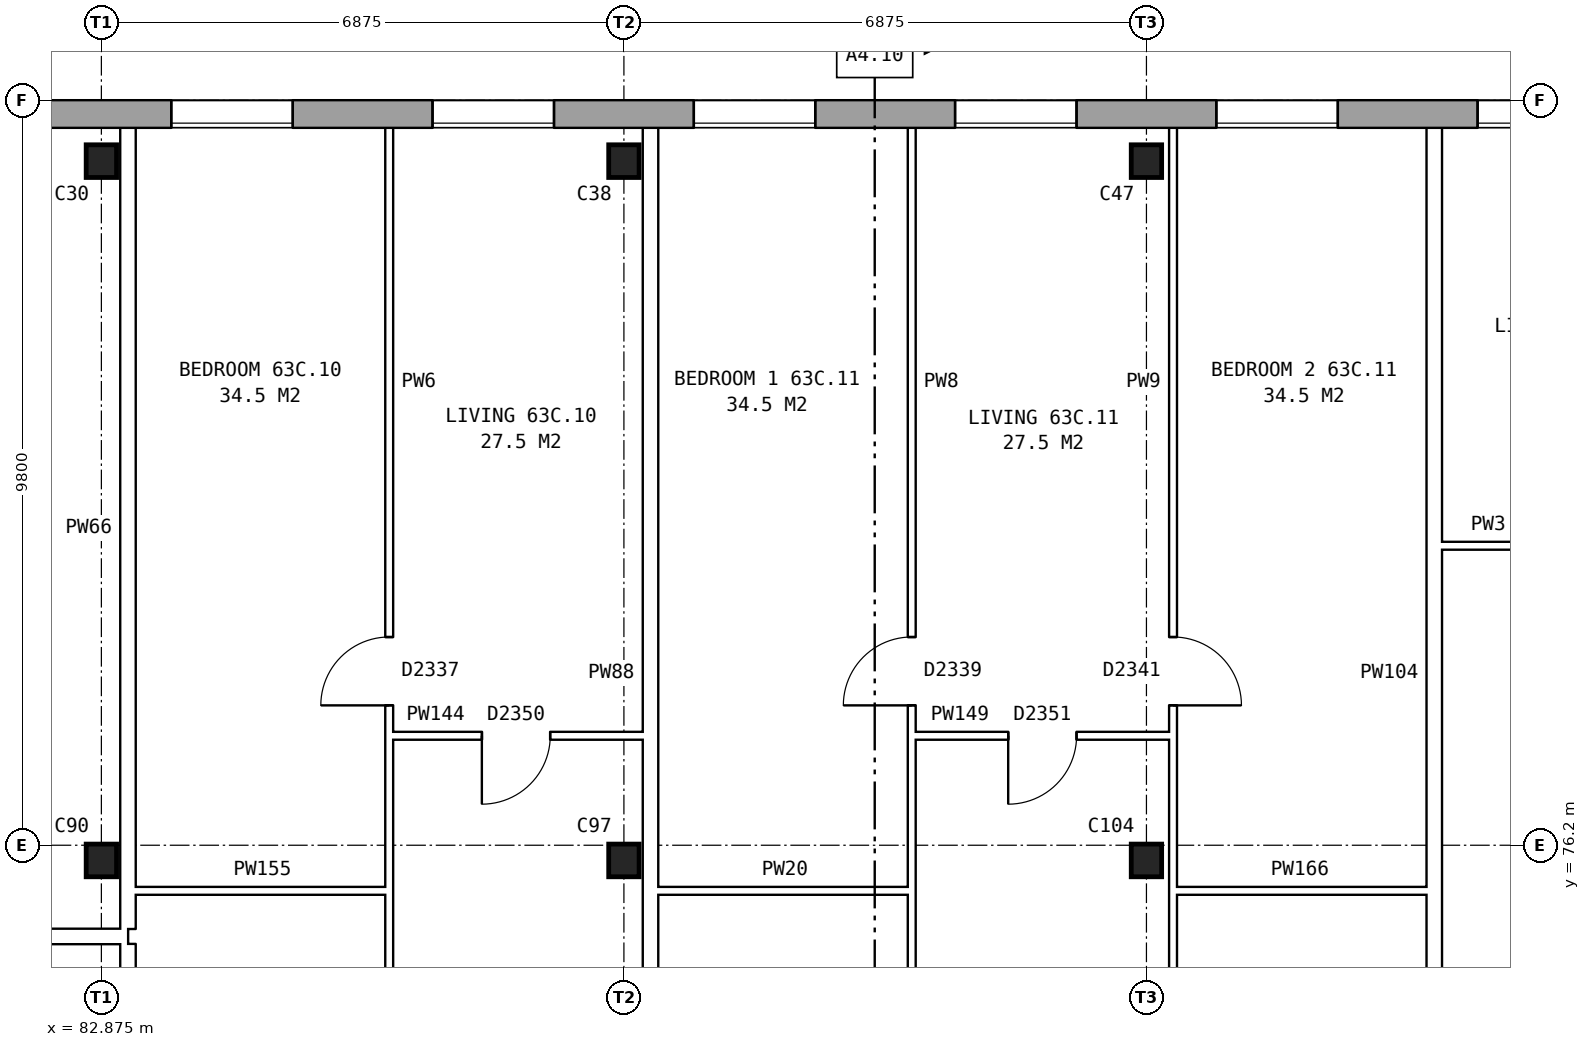
"""IFC4 building model, lengths in metres.
Left out: names, types, materials, properties, quantities, classifications, styles, units other than length and angle.
Written with IfcOpenShell. Run it as: python <this file> out.ifc"""

import sys

from ifc_helpers import new_model, si_unit, direction, frame, frame_2d, origin, origin_2d, place, context, subcontext, project, spatial, rectangle, i_section, extrude, element, fill, save


model = new_model("IFC4")
c1 = context("Model", 3, precision=1e-05, world=origin(), true_north=direction((0.0, 1.0)))
c2 = subcontext(c1, "Body", "Model", "MODEL_VIEW")
j1 = project(units=[si_unit("LENGTHUNIT", "METRE"), si_unit("PLANEANGLEUNIT", "RADIAN")], contexts=[c1])
p1 = place(None, origin())
s1 = spatial("IfcSite", under=j1, at=p1, CompositionType="ELEMENT")
p2 = place(p1, origin())
s2 = spatial("IfcBuilding", under=s1, at=p2, CompositionType="ELEMENT")
p3 = place(p2, frame((0.0, 0.0, 224.5)))
s3 = spatial("IfcBuildingStorey", under=s2, at=p3, CompositionType="ELEMENT", Elevation=224.5)
for number, where, z_axis, x_axis in (
    (1, (82.875, 76.0, 0.0), (0.0, 0.0, 1.0), (1.0, 0.0, 0.0)),
    (2, (89.75, 76.0, 0.0), (0.0, 0.0, 1.0), (1.0, 0.0, 0.0)),
    (3, (96.625, 76.0, 0.0), (0.0, 0.0, 1.0), (1.0, 0.0, 0.0)),
    (4, (82.875, 85.2, 0.0), (0.0, 0.0, 1.0), (1.0, 0.0, 0.0)),
    (5, (89.75, 85.2, 0.0), (0.0, 0.0, 1.0), (1.0, 0.0, 0.0)),
    (6, (96.625, 85.2, 0.0), (0.0, 0.0, 1.0), (1.0, 0.0, 0.0)),
):
    element("IfcColumn", number, at=place(p3, frame(where, z_axis=z_axis, x_axis=x_axis)), inside=s3, PredefinedType="COLUMN", context=c2, shape_type="SweptSolid", body=[
        extrude(i_section(OverallWidth=0.4, OverallDepth=0.43, WebThickness=0.04, FlangeThickness=0.04, at=origin_2d()), origin(), (0.0, 0.0, 1.0), 2.85),
    ])
p4 = place(p3, frame((131.05, 85.82, 0.0), z_axis=(0.0, 0.0, 1.0), x_axis=(-1.0, 0.0, 0.0)))
e7 = element("IfcWall", 7, at=p4, inside=s3, PredefinedType="STANDARD", context=c2, shape_type="SweptSolid", body=[
    extrude(rectangle(XDim=55.1, YDim=0.36, at=frame_2d((27.55, 0.0))), origin(), (0.0, 0.0, 1.0), 2.85),
])
p5 = place(p4, frame((0.969, 0.0, 0.8)))
e8 = element("IfcOpeningElement", 8, at=p5, cuts=e7, PredefinedType="OPENING", context=c2, shape_type="SweptSolid", body=[
    extrude(rectangle(XDim=1.6, YDim=1.8, at=frame_2d((0.8, 0.9))), frame((0.0, 0.19, 0.0), z_axis=(0.0, -1.0, 0.0), x_axis=(1.0, 0.0, 0.0)), (0.0, 0.0, 1.0), 0.38),
])
p6 = place(p4, frame((4.406, 0.0, 0.8)))
e9 = element("IfcOpeningElement", 9, at=p6, cuts=e7, PredefinedType="OPENING", context=c2, shape_type="SweptSolid", body=[
    extrude(rectangle(XDim=1.6, YDim=1.8, at=frame_2d((0.8, 0.9))), frame((0.0, 0.19, 0.0), z_axis=(0.0, -1.0, 0.0), x_axis=(1.0, 0.0, 0.0)), (0.0, 0.0, 1.0), 0.38),
])
p7 = place(p4, frame((7.844, 0.0, 0.8)))
e10 = element("IfcOpeningElement", 10, at=p7, cuts=e7, PredefinedType="OPENING", context=c2, shape_type="SweptSolid", body=[
    extrude(rectangle(XDim=1.6, YDim=1.8, at=frame_2d((0.8, 0.9))), frame((0.0, 0.19, 0.0), z_axis=(0.0, -1.0, 0.0), x_axis=(1.0, 0.0, 0.0)), (0.0, 0.0, 1.0), 0.38),
])
p8 = place(p4, frame((11.281, 0.0, 0.8)))
e11 = element("IfcOpeningElement", 11, at=p8, cuts=e7, PredefinedType="OPENING", context=c2, shape_type="SweptSolid", body=[
    extrude(rectangle(XDim=1.6, YDim=1.8, at=frame_2d((0.8, 0.9))), frame((0.0, 0.19, 0.0), z_axis=(0.0, -1.0, 0.0), x_axis=(1.0, 0.0, 0.0)), (0.0, 0.0, 1.0), 0.38),
])
p9 = place(p4, frame((14.719, 0.0, 0.8)))
e12 = element("IfcOpeningElement", 12, at=p9, cuts=e7, PredefinedType="OPENING", context=c2, shape_type="SweptSolid", body=[
    extrude(rectangle(XDim=1.6, YDim=1.8, at=frame_2d((0.8, 0.9))), frame((0.0, 0.19, 0.0), z_axis=(0.0, -1.0, 0.0), x_axis=(1.0, 0.0, 0.0)), (0.0, 0.0, 1.0), 0.38),
])
p10 = place(p4, frame((18.156, 0.0, 0.8)))
e13 = element("IfcOpeningElement", 13, at=p10, cuts=e7, PredefinedType="OPENING", context=c2, shape_type="SweptSolid", body=[
    extrude(rectangle(XDim=1.6, YDim=1.8, at=frame_2d((0.8, 0.9))), frame((0.0, 0.19, 0.0), z_axis=(0.0, -1.0, 0.0), x_axis=(1.0, 0.0, 0.0)), (0.0, 0.0, 1.0), 0.38),
])
p11 = place(p4, frame((21.594, 0.0, 0.8)))
e14 = element("IfcOpeningElement", 14, at=p11, cuts=e7, PredefinedType="OPENING", context=c2, shape_type="SweptSolid", body=[
    extrude(rectangle(XDim=1.6, YDim=1.8, at=frame_2d((0.8, 0.9))), frame((0.0, 0.19, 0.0), z_axis=(0.0, -1.0, 0.0), x_axis=(1.0, 0.0, 0.0)), (0.0, 0.0, 1.0), 0.38),
])
p12 = place(p4, frame((25.031, 0.0, 0.8)))
e15 = element("IfcOpeningElement", 15, at=p12, cuts=e7, PredefinedType="OPENING", context=c2, shape_type="SweptSolid", body=[
    extrude(rectangle(XDim=1.6, YDim=1.8, at=frame_2d((0.8, 0.9))), frame((0.0, 0.19, 0.0), z_axis=(0.0, -1.0, 0.0), x_axis=(1.0, 0.0, 0.0)), (0.0, 0.0, 1.0), 0.38),
])
p13 = place(p4, frame((28.469, 0.0, 0.8)))
e16 = element("IfcOpeningElement", 16, at=p13, cuts=e7, PredefinedType="OPENING", context=c2, shape_type="SweptSolid", body=[
    extrude(rectangle(XDim=1.6, YDim=1.8, at=frame_2d((0.8, 0.9))), frame((0.0, 0.19, 0.0), z_axis=(0.0, -1.0, 0.0), x_axis=(1.0, 0.0, 0.0)), (0.0, 0.0, 1.0), 0.38),
])
p14 = place(p4, frame((31.906, 0.0, 0.8)))
e17 = element("IfcOpeningElement", 17, at=p14, cuts=e7, PredefinedType="OPENING", context=c2, shape_type="SweptSolid", body=[
    extrude(rectangle(XDim=1.6, YDim=1.8, at=frame_2d((0.8, 0.9))), frame((0.0, 0.19, 0.0), z_axis=(0.0, -1.0, 0.0), x_axis=(1.0, 0.0, 0.0)), (0.0, 0.0, 1.0), 0.38),
])
p15 = place(p4, frame((35.344, 0.0, 0.8)))
e18 = element("IfcOpeningElement", 18, at=p15, cuts=e7, PredefinedType="OPENING", context=c2, shape_type="SweptSolid", body=[
    extrude(rectangle(XDim=1.6, YDim=1.8, at=frame_2d((0.8, 0.9))), frame((0.0, 0.19, 0.0), z_axis=(0.0, -1.0, 0.0), x_axis=(1.0, 0.0, 0.0)), (0.0, 0.0, 1.0), 0.38),
])
p16 = place(p4, frame((38.781, 0.0, 0.8)))
e19 = element("IfcOpeningElement", 19, at=p16, cuts=e7, PredefinedType="OPENING", context=c2, shape_type="SweptSolid", body=[
    extrude(rectangle(XDim=1.6, YDim=1.8, at=frame_2d((0.8, 0.9))), frame((0.0, 0.19, 0.0), z_axis=(0.0, -1.0, 0.0), x_axis=(1.0, 0.0, 0.0)), (0.0, 0.0, 1.0), 0.38),
])
p17 = place(p4, frame((42.219, 0.0, 0.8)))
e20 = element("IfcOpeningElement", 20, at=p17, cuts=e7, PredefinedType="OPENING", context=c2, shape_type="SweptSolid", body=[
    extrude(rectangle(XDim=1.6, YDim=1.8, at=frame_2d((0.8, 0.9))), frame((0.0, 0.19, 0.0), z_axis=(0.0, -1.0, 0.0), x_axis=(1.0, 0.0, 0.0)), (0.0, 0.0, 1.0), 0.38),
])
p18 = place(p4, frame((45.656, 0.0, 0.8)))
e21 = element("IfcOpeningElement", 21, at=p18, cuts=e7, PredefinedType="OPENING", context=c2, shape_type="SweptSolid", body=[
    extrude(rectangle(XDim=1.6, YDim=1.8, at=frame_2d((0.8, 0.9))), frame((0.0, 0.19, 0.0), z_axis=(0.0, -1.0, 0.0), x_axis=(1.0, 0.0, 0.0)), (0.0, 0.0, 1.0), 0.38),
])
p19 = place(p4, frame((49.094, 0.0, 0.8)))
e22 = element("IfcOpeningElement", 22, at=p19, cuts=e7, PredefinedType="OPENING", context=c2, shape_type="SweptSolid", body=[
    extrude(rectangle(XDim=1.6, YDim=1.8, at=frame_2d((0.8, 0.9))), frame((0.0, 0.19, 0.0), z_axis=(0.0, -1.0, 0.0), x_axis=(1.0, 0.0, 0.0)), (0.0, 0.0, 1.0), 0.38),
])
p20 = place(p4, frame((52.531, 0.0, 0.8)))
e23 = element("IfcOpeningElement", 23, at=p20, cuts=e7, PredefinedType="OPENING", context=c2, shape_type="SweptSolid", body=[
    extrude(rectangle(XDim=1.6, YDim=1.8, at=frame_2d((0.8, 0.9))), frame((0.0, 0.19, 0.0), z_axis=(0.0, -1.0, 0.0), x_axis=(1.0, 0.0, 0.0)), (0.0, 0.0, 1.0), 0.38),
])
p21 = place(p3, frame((75.64, 75.0, 0.0), z_axis=(0.0, 0.0, 1.0), x_axis=(1.0, 0.0, 0.0)))
e24 = element("IfcWall", 24, at=p21, inside=s3, PredefinedType="PARTITIONING", context=c2, shape_type="SweptSolid", body=[
    extrude(rectangle(XDim=7.585, YDim=0.2, at=frame_2d((3.792, 0.0))), origin(), (0.0, 0.0, 1.0), 2.85),
])
p22 = place(p21, frame((3.343, 0.0, 0.0)))
e25 = element("IfcOpeningElement", 25, at=p22, cuts=e24, PredefinedType="OPENING", context=c2, shape_type="SweptSolid", body=[
    extrude(rectangle(XDim=0.9, YDim=2.1, at=frame_2d((0.45, 1.05))), frame((0.0, 0.11, 0.0), z_axis=(0.0, -1.0, 0.0), x_axis=(1.0, 0.0, 0.0)), (0.0, 0.0, 1.0), 0.22),
])
for number, where, z_axis, x_axis in (
    (26, (83.325, 75.6, 0.0), (0.0, 0.0, 1.0), (1.0, 0.0, 0.0)),
    (27, (90.2, 75.6, 0.0), (0.0, 0.0, 1.0), (1.0, 0.0, 0.0)),
):
    element("IfcWall", number, at=place(p3, frame(where, z_axis=z_axis, x_axis=x_axis)), inside=s3, PredefinedType="PARTITIONING", context=c2, shape_type="SweptSolid", body=[
        extrude(rectangle(XDim=3.337, YDim=0.1, at=frame_2d((1.668, 0.0))), origin(), (0.0, 0.0, 1.0), 2.85),
    ])
p23 = place(p3, frame((96.975, 75.6, 0.0), z_axis=(0.0, 0.0, 1.0), x_axis=(1.0, 0.0, 0.0)))
e28 = element("IfcWall", 28, at=p23, inside=s3, PredefinedType="PARTITIONING", context=c2, shape_type="SweptSolid", body=[
    extrude(rectangle(XDim=3.337, YDim=0.1, at=frame_2d((1.668, 0.0))), origin(), (0.0, 0.0, 1.0), 2.85),
])
p24 = place(p3, frame((86.662, 77.64, 0.0), z_axis=(0.0, 0.0, 1.0), x_axis=(1.0, 0.0, 0.0)))
e29 = element("IfcWall", 29, at=p24, inside=s3, PredefinedType="PARTITIONING", context=c2, shape_type="SweptSolid", body=[
    extrude(rectangle(XDim=3.338, YDim=0.1, at=frame_2d((1.669, 0.0))), origin(), (0.0, 0.0, 1.0), 2.85),
])
p25 = place(p24, frame((1.219, 0.0, 0.0)))
e30 = element("IfcOpeningElement", 30, at=p25, cuts=e29, PredefinedType="OPENING", context=c2, shape_type="SweptSolid", body=[
    extrude(rectangle(XDim=0.9, YDim=2.1, at=frame_2d((0.45, 1.05))), frame((0.0, 0.06, 0.0), z_axis=(0.0, -1.0, 0.0), x_axis=(1.0, 0.0, 0.0)), (0.0, 0.0, 1.0), 0.12),
])
p26 = place(p3, frame((93.537, 77.64, 0.0), z_axis=(0.0, 0.0, 1.0), x_axis=(1.0, 0.0, 0.0)))
e31 = element("IfcWall", 31, at=p26, inside=s3, PredefinedType="PARTITIONING", context=c2, shape_type="SweptSolid", body=[
    extrude(rectangle(XDim=3.438, YDim=0.1, at=frame_2d((1.719, 0.0))), origin(), (0.0, 0.0, 1.0), 2.85),
])
p27 = place(p26, frame((1.269, 0.0, 0.0)))
e32 = element("IfcOpeningElement", 32, at=p27, cuts=e31, PredefinedType="OPENING", context=c2, shape_type="SweptSolid", body=[
    extrude(rectangle(XDim=0.9, YDim=2.1, at=frame_2d((0.45, 1.05))), frame((0.0, 0.06, 0.0), z_axis=(0.0, -1.0, 0.0), x_axis=(1.0, 0.0, 0.0)), (0.0, 0.0, 1.0), 0.12),
])
p28 = place(p3, frame((100.512, 80.14, 0.0), z_axis=(0.0, 0.0, 1.0), x_axis=(1.0, 0.0, 0.0)))
e33 = element("IfcWall", 33, at=p28, inside=s3, PredefinedType="PARTITIONING", context=c2, shape_type="SweptSolid", body=[
    extrude(rectangle(XDim=3.338, YDim=0.1, at=frame_2d((1.669, 0.0))), origin(), (0.0, 0.0, 1.0), 2.85),
])
p29 = place(p28, frame((1.219, 0.0, 0.0)))
e34 = element("IfcOpeningElement", 34, at=p29, cuts=e33, PredefinedType="OPENING", context=c2, shape_type="SweptSolid", body=[
    extrude(rectangle(XDim=0.9, YDim=2.1, at=frame_2d((0.45, 1.05))), frame((0.0, 0.06, 0.0), z_axis=(0.0, -1.0, 0.0), x_axis=(1.0, 0.0, 0.0)), (0.0, 0.0, 1.0), 0.12),
])
p30 = place(p3, frame((83.225, 71.3, 0.0), z_axis=(0.0, 0.0, 1.0), x_axis=(0.0, 1.0, 0.0)))
e35 = element("IfcWall", 35, at=p30, inside=s3, PredefinedType="PARTITIONING", context=c2, shape_type="SweptSolid", body=[
    extrude(rectangle(XDim=3.6, YDim=0.2, at=frame_2d((1.8, 0.0))), origin(), (0.0, 0.0, 1.0), 2.85),
])
p31 = place(p3, frame((83.225, 75.1, 0.0), z_axis=(0.0, 0.0, 1.0), x_axis=(0.0, 1.0, 0.0)))
e36 = element("IfcWall", 36, at=p31, inside=s3, PredefinedType="PARTITIONING", context=c2, shape_type="SweptSolid", body=[
    extrude(rectangle(XDim=10.54, YDim=0.2, at=frame_2d((5.27, 0.0))), origin(), (0.0, 0.0, 1.0), 2.85),
])
p32 = place(p3, frame((86.662, 71.3, 0.0), z_axis=(0.0, 0.0, 1.0), x_axis=(0.0, 1.0, 0.0)))
e37 = element("IfcWall", 37, at=p32, inside=s3, PredefinedType="PARTITIONING", context=c2, shape_type="SweptSolid", body=[
    extrude(rectangle(XDim=14.34, YDim=0.1, at=frame_2d((7.17, 0.0))), origin(), (0.0, 0.0, 1.0), 2.85),
])
p33 = place(p32, frame((6.74, 0.0, 0.0)))
e38 = element("IfcOpeningElement", 38, at=p33, cuts=e37, PredefinedType="OPENING", context=c2, shape_type="SweptSolid", body=[
    extrude(rectangle(XDim=0.9, YDim=2.1, at=frame_2d((0.45, 1.05))), frame((0.0, 0.06, 0.0), z_axis=(0.0, -1.0, 0.0), x_axis=(1.0, 0.0, 0.0)), (0.0, 0.0, 1.0), 0.12),
])
p34 = place(p32, frame((0.4, 0.0, 0.0)))
e39 = element("IfcOpeningElement", 39, at=p34, cuts=e37, PredefinedType="OPENING", context=c2, shape_type="SweptSolid", body=[
    extrude(rectangle(XDim=0.9, YDim=2.1, at=frame_2d((0.45, 1.05))), frame((0.0, 0.06, 0.0), z_axis=(0.0, -1.0, 0.0), x_axis=(1.0, 0.0, 0.0)), (0.0, 0.0, 1.0), 0.12),
])
p35 = place(p3, frame((90.1, 71.3, 0.0), z_axis=(0.0, 0.0, 1.0), x_axis=(0.0, 1.0, 0.0)))
e40 = element("IfcWall", 40, at=p35, inside=s3, PredefinedType="PARTITIONING", context=c2, shape_type="SweptSolid", body=[
    extrude(rectangle(XDim=14.34, YDim=0.2, at=frame_2d((7.17, 0.0))), origin(), (0.0, 0.0, 1.0), 2.85),
])
p36 = place(p3, frame((93.537, 71.3, 0.0), z_axis=(0.0, 0.0, 1.0), x_axis=(0.0, 1.0, 0.0)))
e41 = element("IfcWall", 41, at=p36, inside=s3, PredefinedType="PARTITIONING", context=c2, shape_type="SweptSolid", body=[
    extrude(rectangle(XDim=14.34, YDim=0.1, at=frame_2d((7.17, 0.0))), origin(), (0.0, 0.0, 1.0), 2.85),
])
p37 = place(p36, frame((6.74, 0.0, 0.0)))
e42 = element("IfcOpeningElement", 42, at=p37, cuts=e41, PredefinedType="OPENING", context=c2, shape_type="SweptSolid", body=[
    extrude(rectangle(XDim=0.9, YDim=2.1, at=frame_2d((0.45, 1.05))), frame((0.0, 0.06, 0.0), z_axis=(0.0, -1.0, 0.0), x_axis=(1.0, 0.0, 0.0)), (0.0, 0.0, 1.0), 0.12),
])
p38 = place(p36, frame((0.4, 0.0, 0.0)))
e43 = element("IfcOpeningElement", 43, at=p38, cuts=e41, PredefinedType="OPENING", context=c2, shape_type="SweptSolid", body=[
    extrude(rectangle(XDim=0.9, YDim=2.1, at=frame_2d((0.45, 1.05))), frame((0.0, 0.06, 0.0), z_axis=(0.0, -1.0, 0.0), x_axis=(1.0, 0.0, 0.0)), (0.0, 0.0, 1.0), 0.12),
])
p39 = place(p3, frame((96.975, 71.3, 0.0), z_axis=(0.0, 0.0, 1.0), x_axis=(0.0, 1.0, 0.0)))
e44 = element("IfcWall", 44, at=p39, inside=s3, PredefinedType="PARTITIONING", context=c2, shape_type="SweptSolid", body=[
    extrude(rectangle(XDim=14.34, YDim=0.1, at=frame_2d((7.17, 0.0))), origin(), (0.0, 0.0, 1.0), 2.85),
])
p40 = place(p39, frame((6.74, 0.0, 0.0)))
e45 = element("IfcOpeningElement", 45, at=p40, cuts=e44, PredefinedType="OPENING", context=c2, shape_type="SweptSolid", body=[
    extrude(rectangle(XDim=0.9, YDim=2.1, at=frame_2d((0.45, 1.05))), frame((0.0, 0.06, 0.0), z_axis=(0.0, -1.0, 0.0), x_axis=(1.0, 0.0, 0.0)), (0.0, 0.0, 1.0), 0.12),
])
p41 = place(p39, frame((0.4, 0.0, 0.0)))
e46 = element("IfcOpeningElement", 46, at=p41, cuts=e44, PredefinedType="OPENING", context=c2, shape_type="SweptSolid", body=[
    extrude(rectangle(XDim=0.9, YDim=2.1, at=frame_2d((0.45, 1.05))), frame((0.0, 0.06, 0.0), z_axis=(0.0, -1.0, 0.0), x_axis=(1.0, 0.0, 0.0)), (0.0, 0.0, 1.0), 0.12),
])
p42 = place(p3, frame((100.412, 71.3, 0.0), z_axis=(0.0, 0.0, 1.0), x_axis=(0.0, 1.0, 0.0)))
e47 = element("IfcWall", 47, at=p42, inside=s3, PredefinedType="PARTITIONING", context=c2, shape_type="SweptSolid", body=[
    extrude(rectangle(XDim=14.34, YDim=0.2, at=frame_2d((7.17, 0.0))), origin(), (0.0, 0.0, 1.0), 2.85),
])
p43 = place(p13, origin())
e48 = element("IfcWindow", 48, at=p43, inside=s3, PartitioningType="SINGLE_PANEL", PredefinedType="WINDOW", context=c2, shape_type="SweptSolid", body=[
    extrude(rectangle(XDim=1.6, YDim=1.8, at=frame_2d((0.8, 0.9))), frame((0.0, 0.15, 0.0), z_axis=(0.0, -1.0, 0.0), x_axis=(1.0, 0.0, 0.0)), (0.0, 0.0, 1.0), 0.06),
])
fill(e16, e48)
p44 = place(p14, origin())
e49 = element("IfcWindow", 49, at=p44, inside=s3, PartitioningType="SINGLE_PANEL", PredefinedType="WINDOW", context=c2, shape_type="SweptSolid", body=[
    extrude(rectangle(XDim=1.6, YDim=1.8, at=frame_2d((0.8, 0.9))), frame((0.0, 0.15, 0.0), z_axis=(0.0, -1.0, 0.0), x_axis=(1.0, 0.0, 0.0)), (0.0, 0.0, 1.0), 0.06),
])
fill(e17, e49)
p45 = place(p15, origin())
e50 = element("IfcWindow", 50, at=p45, inside=s3, PartitioningType="SINGLE_PANEL", PredefinedType="WINDOW", context=c2, shape_type="SweptSolid", body=[
    extrude(rectangle(XDim=1.6, YDim=1.8, at=frame_2d((0.8, 0.9))), frame((0.0, 0.15, 0.0), z_axis=(0.0, -1.0, 0.0), x_axis=(1.0, 0.0, 0.0)), (0.0, 0.0, 1.0), 0.06),
])
fill(e18, e50)
p46 = place(p16, origin())
e51 = element("IfcWindow", 51, at=p46, inside=s3, PartitioningType="SINGLE_PANEL", PredefinedType="WINDOW", context=c2, shape_type="SweptSolid", body=[
    extrude(rectangle(XDim=1.6, YDim=1.8, at=frame_2d((0.8, 0.9))), frame((0.0, 0.15, 0.0), z_axis=(0.0, -1.0, 0.0), x_axis=(1.0, 0.0, 0.0)), (0.0, 0.0, 1.0), 0.06),
])
fill(e19, e51)
p47 = place(p17, origin())
e52 = element("IfcWindow", 52, at=p47, inside=s3, PartitioningType="SINGLE_PANEL", PredefinedType="WINDOW", context=c2, shape_type="SweptSolid", body=[
    extrude(rectangle(XDim=1.6, YDim=1.8, at=frame_2d((0.8, 0.9))), frame((0.0, 0.15, 0.0), z_axis=(0.0, -1.0, 0.0), x_axis=(1.0, 0.0, 0.0)), (0.0, 0.0, 1.0), 0.06),
])
fill(e20, e52)
p48 = place(p18, origin())
e53 = element("IfcWindow", 53, at=p48, inside=s3, PartitioningType="SINGLE_PANEL", PredefinedType="WINDOW", context=c2, shape_type="SweptSolid", body=[
    extrude(rectangle(XDim=1.6, YDim=1.8, at=frame_2d((0.8, 0.9))), frame((0.0, 0.15, 0.0), z_axis=(0.0, -1.0, 0.0), x_axis=(1.0, 0.0, 0.0)), (0.0, 0.0, 1.0), 0.06),
])
fill(e21, e53)
p49 = place(p33, origin())
e54 = element("IfcDoor", 54, at=p49, inside=s3, OperationType="SINGLE_SWING_LEFT", PredefinedType="DOOR", context=c2, shape_type="SweptSolid", body=[
    extrude(rectangle(XDim=0.9, YDim=2.1, at=frame_2d((0.45, 1.05))), frame((0.0, 0.025, 0.0), z_axis=(0.0, -1.0, 0.0), x_axis=(1.0, 0.0, 0.0)), (0.0, 0.0, 1.0), 0.05),
])
fill(e38, e54)
p50 = place(p25, frame((0.9, 0.0, 0.0), z_axis=(0.0, 0.0, 1.0), x_axis=(-1.0, 0.0, 0.0)))
e55 = element("IfcDoor", 55, at=p50, inside=s3, OperationType="SINGLE_SWING_RIGHT", PredefinedType="DOOR", context=c2, shape_type="SweptSolid", body=[
    extrude(rectangle(XDim=0.9, YDim=2.1, at=frame_2d((0.45, 1.05))), frame((0.0, 0.025, 0.0), z_axis=(0.0, -1.0, 0.0), x_axis=(1.0, 0.0, 0.0)), (0.0, 0.0, 1.0), 0.05),
])
fill(e30, e55)
p51 = place(p37, origin())
e56 = element("IfcDoor", 56, at=p51, inside=s3, OperationType="SINGLE_SWING_LEFT", PredefinedType="DOOR", context=c2, shape_type="SweptSolid", body=[
    extrude(rectangle(XDim=0.9, YDim=2.1, at=frame_2d((0.45, 1.05))), frame((0.0, 0.025, 0.0), z_axis=(0.0, -1.0, 0.0), x_axis=(1.0, 0.0, 0.0)), (0.0, 0.0, 1.0), 0.05),
])
fill(e42, e56)
p52 = place(p40, frame((0.9, 0.0, 0.0), z_axis=(0.0, 0.0, 1.0), x_axis=(-1.0, 0.0, 0.0)))
e57 = element("IfcDoor", 57, at=p52, inside=s3, OperationType="SINGLE_SWING_RIGHT", PredefinedType="DOOR", context=c2, shape_type="SweptSolid", body=[
    extrude(rectangle(XDim=0.9, YDim=2.1, at=frame_2d((0.45, 1.05))), frame((0.0, 0.025, 0.0), z_axis=(0.0, -1.0, 0.0), x_axis=(1.0, 0.0, 0.0)), (0.0, 0.0, 1.0), 0.05),
])
fill(e45, e57)
p53 = place(p27, frame((0.9, 0.0, 0.0), z_axis=(0.0, 0.0, 1.0), x_axis=(-1.0, 0.0, 0.0)))
e58 = element("IfcDoor", 58, at=p53, inside=s3, OperationType="SINGLE_SWING_RIGHT", PredefinedType="DOOR", context=c2, shape_type="SweptSolid", body=[
    extrude(rectangle(XDim=0.9, YDim=2.1, at=frame_2d((0.45, 1.05))), frame((0.0, 0.025, 0.0), z_axis=(0.0, -1.0, 0.0), x_axis=(1.0, 0.0, 0.0)), (0.0, 0.0, 1.0), 0.05),
])
fill(e32, e58)
save(model, sys.argv[1])
